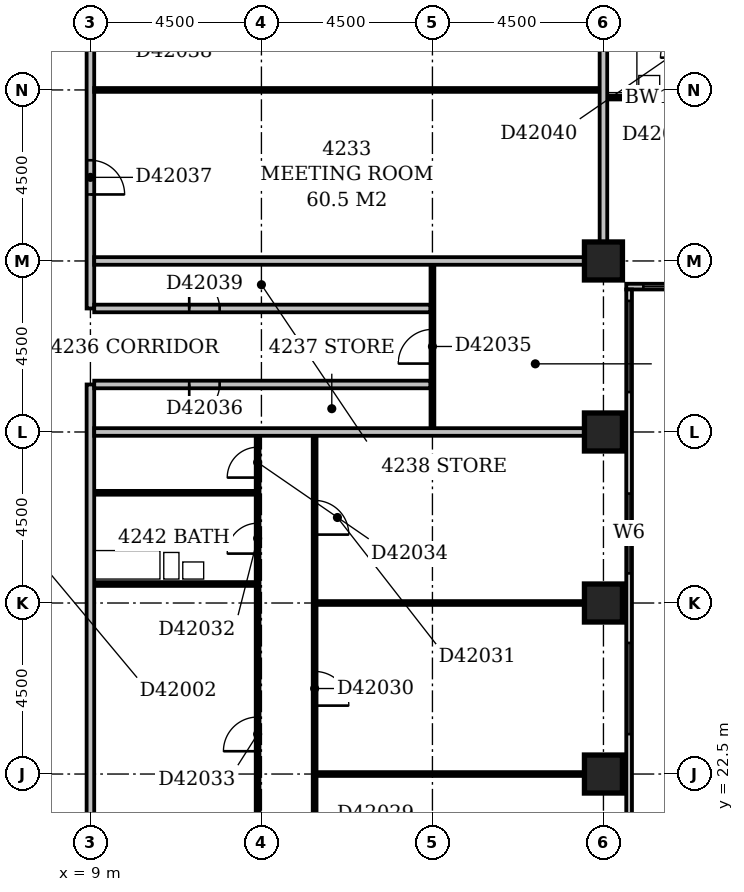
"""IFC4 building model, lengths in metres.
Left out: names, types, materials, properties, quantities, classifications, styles, units other than length and angle.
Written with IfcOpenShell. Run it as: python <this file> out.ifc"""

import sys

from ifc_helpers import new_model, si_unit, direction, frame, frame_2d, origin, origin_2d, place, context, subcontext, project, spatial, rectangle, extrude, element, fill, save


model = new_model("IFC4")
c1 = context("Model", 3, precision=1e-05, world=origin(), true_north=direction((0.0, 1.0)))
c2 = subcontext(c1, "Body", "Model", "MODEL_VIEW")
j1 = project(units=[si_unit("LENGTHUNIT", "METRE"), si_unit("PLANEANGLEUNIT", "RADIAN")], contexts=[c1])
p1 = place(None, origin())
s1 = spatial("IfcSite", under=j1, at=p1, CompositionType="ELEMENT")
p2 = place(p1, origin())
s2 = spatial("IfcBuilding", under=s1, at=p2, CompositionType="ELEMENT")
p3 = place(p2, frame((0.0, 0.0, 166.4)))
s3 = spatial("IfcBuildingStorey", under=s2, at=p3, CompositionType="ELEMENT", Elevation=166.4)
for number, where, z_axis, x_axis in (
    (1, (22.5, 22.5, -0.3), (0.0, 0.0, 1.0), (1.0, 0.0, 0.0)),
    (2, (22.5, 27.0, -0.3), (0.0, 0.0, 1.0), (1.0, 0.0, 0.0)),
    (3, (22.5, 31.5, -0.3), (0.0, 0.0, 1.0), (1.0, 0.0, 0.0)),
    (4, (22.5, 36.0, -0.3), (0.0, 0.0, 1.0), (1.0, 0.0, 0.0)),
):
    element("IfcColumn", number, at=place(p3, frame(where, z_axis=z_axis, x_axis=x_axis)), inside=s3, PredefinedType="COLUMN", context=c2, shape_type="SweptSolid", body=[
        extrude(rectangle(XDim=1.0, YDim=1.0, at=origin_2d()), origin(), (0.0, 0.0, 1.0), 3.6),
    ])
p4 = place(p3, frame((23.175, 17.4, 0.0), z_axis=(0.0, 0.0, 1.0), x_axis=(0.0, 1.0, 0.0)))
e5 = element("IfcWall", 5, at=p4, inside=s3, PredefinedType="STANDARD", context=c2, shape_type="SweptSolid", body=[
    extrude(rectangle(XDim=17.85, YDim=0.15, at=frame_2d((8.925, 0.0))), origin(), (0.0, 0.0, 1.0), 2.7),
])
p5 = place(p4, frame((1.65, 0.0, 0.6)))
e6 = element("IfcOpeningElement", 6, at=p5, cuts=e5, PredefinedType="OPENING", context=c2, shape_type="SweptSolid", body=[
    extrude(rectangle(XDim=2.4, YDim=1.8, at=frame_2d((1.2, 0.9))), frame((0.0, 0.087, 0.0), z_axis=(0.0, -1.0, 0.0), x_axis=(1.0, 0.0, 0.0)), (0.0, 0.0, 1.0), 0.174),
])
p6 = place(p4, frame((6.15, 0.0, 0.6)))
e7 = element("IfcOpeningElement", 7, at=p6, cuts=e5, PredefinedType="OPENING", context=c2, shape_type="SweptSolid", body=[
    extrude(rectangle(XDim=2.4, YDim=1.8, at=frame_2d((1.2, 0.9))), frame((0.0, 0.087, 0.0), z_axis=(0.0, -1.0, 0.0), x_axis=(1.0, 0.0, 0.0)), (0.0, 0.0, 1.0), 0.174),
])
p7 = place(p4, frame((10.38, 0.0, 0.6)))
e8 = element("IfcOpeningElement", 8, at=p7, cuts=e5, PredefinedType="OPENING", context=c2, shape_type="SweptSolid", body=[
    extrude(rectangle(XDim=2.1, YDim=1.8, at=frame_2d((1.05, 0.9))), frame((0.0, 0.087, 0.0), z_axis=(0.0, -1.0, 0.0), x_axis=(1.0, 0.0, 0.0)), (0.0, 0.0, 1.0), 0.174),
])
p8 = place(p4, frame((15.15, 0.0, 0.6)))
e9 = element("IfcOpeningElement", 9, at=p8, cuts=e5, PredefinedType="OPENING", context=c2, shape_type="SweptSolid", body=[
    extrude(rectangle(XDim=2.4, YDim=1.8, at=frame_2d((1.2, 0.9))), frame((0.0, 0.087, 0.0), z_axis=(0.0, -1.0, 0.0), x_axis=(1.0, 0.0, 0.0)), (0.0, 0.0, 1.0), 0.174),
])
p9 = place(p3, frame((23.1, 35.325, 0.0), z_axis=(0.0, 0.0, 1.0), x_axis=(1.0, 0.0, 0.0)))
e10 = element("IfcWall", 10, at=p9, inside=s3, PredefinedType="STANDARD", context=c2, shape_type="SweptSolid", body=[
    extrude(rectangle(XDim=45.15, YDim=0.15, at=frame_2d((22.575, 0.0))), origin(), (0.0, 0.0, 1.0), 2.7),
])
p10 = place(p9, frame((0.45, 0.0, 0.6)))
e11 = element("IfcOpeningElement", 11, at=p10, cuts=e10, PredefinedType="OPENING", context=c2, shape_type="SweptSolid", body=[
    extrude(rectangle(XDim=2.4, YDim=1.8, at=frame_2d((1.2, 0.9))), frame((0.0, 0.087, 0.0), z_axis=(0.0, -1.0, 0.0), x_axis=(1.0, 0.0, 0.0)), (0.0, 0.0, 1.0), 0.174),
])
p11 = place(p9, frame((4.95, 0.0, 0.6)))
e12 = element("IfcOpeningElement", 12, at=p11, cuts=e10, PredefinedType="OPENING", context=c2, shape_type="SweptSolid", body=[
    extrude(rectangle(XDim=2.4, YDim=1.8, at=frame_2d((1.2, 0.9))), frame((0.0, 0.087, 0.0), z_axis=(0.0, -1.0, 0.0), x_axis=(1.0, 0.0, 0.0)), (0.0, 0.0, 1.0), 0.174),
])
p12 = place(p9, frame((10.665, 0.0, 0.6)))
e13 = element("IfcOpeningElement", 13, at=p12, cuts=e10, PredefinedType="OPENING", context=c2, shape_type="SweptSolid", body=[
    extrude(rectangle(XDim=1.5, YDim=1.8, at=frame_2d((0.75, 0.9))), frame((0.0, 0.087, 0.0), z_axis=(0.0, -1.0, 0.0), x_axis=(1.0, 0.0, 0.0)), (0.0, 0.0, 1.0), 0.174),
])
p13 = place(p9, frame((13.731, 0.0, 0.6)))
e14 = element("IfcOpeningElement", 14, at=p13, cuts=e10, PredefinedType="OPENING", context=c2, shape_type="SweptSolid", body=[
    extrude(rectangle(XDim=1.5, YDim=1.8, at=frame_2d((0.75, 0.9))), frame((0.0, 0.087, 0.0), z_axis=(0.0, -1.0, 0.0), x_axis=(1.0, 0.0, 0.0)), (0.0, 0.0, 1.0), 0.174),
])
p14 = place(p9, frame((18.45, 0.0, 0.6)))
e15 = element("IfcOpeningElement", 15, at=p14, cuts=e10, PredefinedType="OPENING", context=c2, shape_type="SweptSolid", body=[
    extrude(rectangle(XDim=2.4, YDim=1.8, at=frame_2d((1.2, 0.9))), frame((0.0, 0.087, 0.0), z_axis=(0.0, -1.0, 0.0), x_axis=(1.0, 0.0, 0.0)), (0.0, 0.0, 1.0), 0.174),
])
p15 = place(p9, frame((22.95, 0.0, 0.6)))
e16 = element("IfcOpeningElement", 16, at=p15, cuts=e10, PredefinedType="OPENING", context=c2, shape_type="SweptSolid", body=[
    extrude(rectangle(XDim=2.4, YDim=1.8, at=frame_2d((1.2, 0.9))), frame((0.0, 0.087, 0.0), z_axis=(0.0, -1.0, 0.0), x_axis=(1.0, 0.0, 0.0)), (0.0, 0.0, 1.0), 0.174),
])
p16 = place(p9, frame((27.45, 0.0, 0.6)))
e17 = element("IfcOpeningElement", 17, at=p16, cuts=e10, PredefinedType="OPENING", context=c2, shape_type="SweptSolid", body=[
    extrude(rectangle(XDim=2.4, YDim=1.8, at=frame_2d((1.2, 0.9))), frame((0.0, 0.087, 0.0), z_axis=(0.0, -1.0, 0.0), x_axis=(1.0, 0.0, 0.0)), (0.0, 0.0, 1.0), 0.174),
])
p17 = place(p9, frame((31.95, 0.0, 0.6)))
e18 = element("IfcOpeningElement", 18, at=p17, cuts=e10, PredefinedType="OPENING", context=c2, shape_type="SweptSolid", body=[
    extrude(rectangle(XDim=2.4, YDim=1.8, at=frame_2d((1.2, 0.9))), frame((0.0, 0.087, 0.0), z_axis=(0.0, -1.0, 0.0), x_axis=(1.0, 0.0, 0.0)), (0.0, 0.0, 1.0), 0.174),
])
p18 = place(p9, frame((36.45, 0.0, 0.6)))
e19 = element("IfcOpeningElement", 19, at=p18, cuts=e10, PredefinedType="OPENING", context=c2, shape_type="SweptSolid", body=[
    extrude(rectangle(XDim=2.4, YDim=1.8, at=frame_2d((1.2, 0.9))), frame((0.0, 0.087, 0.0), z_axis=(0.0, -1.0, 0.0), x_axis=(1.0, 0.0, 0.0)), (0.0, 0.0, 1.0), 0.174),
])
p19 = place(p9, frame((41.172, 0.0, 0.6)))
e20 = element("IfcOpeningElement", 20, at=p19, cuts=e10, PredefinedType="OPENING", context=c2, shape_type="SweptSolid", body=[
    extrude(rectangle(XDim=2.4, YDim=1.8, at=frame_2d((1.2, 0.9))), frame((0.0, 0.087, 0.0), z_axis=(0.0, -1.0, 0.0), x_axis=(1.0, 0.0, 0.0)), (0.0, 0.0, 1.0), 0.174),
])
p20 = place(p3, frame((9.0, 5.0, 0.0), z_axis=(0.0, 0.0, 1.0), x_axis=(0.0, 1.0, 0.0)))
e21 = element("IfcWall", 21, at=p20, inside=s3, PredefinedType="PARTITIONING", context=c2, shape_type="SweptSolid", body=[
    extrude(rectangle(XDim=27.75, YDim=0.2, at=frame_2d((13.875, 0.0))), origin(), (0.0, 0.0, 1.0), 3.3),
])
p21 = place(p20, frame((13.3, 0.0, 0.0)))
e22 = element("IfcOpeningElement", 22, at=p21, cuts=e21, PredefinedType="OPENING", context=c2, shape_type="SweptSolid", body=[
    extrude(rectangle(XDim=1.0, YDim=2.1, at=frame_2d((0.5, 1.05))), frame((0.0, 0.112, 0.0), z_axis=(0.0, -1.0, 0.0), x_axis=(1.0, 0.0, 0.0)), (0.0, 0.0, 1.0), 0.224),
])
p22 = place(p20, frame((10.45, 0.0, 0.0)))
e23 = element("IfcOpeningElement", 23, at=p22, cuts=e21, PredefinedType="OPENING", context=c2, shape_type="SweptSolid", body=[
    extrude(rectangle(XDim=1.0, YDim=2.1, at=frame_2d((0.5, 1.05))), frame((0.0, 0.112, 0.0), z_axis=(0.0, -1.0, 0.0), x_axis=(1.0, 0.0, 0.0)), (0.0, 0.0, 1.0), 0.224),
])
p23 = place(p20, frame((5.95, 0.0, 0.0)))
e24 = element("IfcOpeningElement", 24, at=p23, cuts=e21, PredefinedType="OPENING", context=c2, shape_type="SweptSolid", body=[
    extrude(rectangle(XDim=1.0, YDim=2.1, at=frame_2d((0.5, 1.05))), frame((0.0, 0.112, 0.0), z_axis=(0.0, -1.0, 0.0), x_axis=(1.0, 0.0, 0.0)), (0.0, 0.0, 1.0), 0.224),
])
p24 = place(p20, frame((1.5, 0.0, 0.0)))
e25 = element("IfcOpeningElement", 25, at=p24, cuts=e21, PredefinedType="OPENING", context=c2, shape_type="SweptSolid", body=[
    extrude(rectangle(XDim=0.9, YDim=2.1, at=frame_2d((0.45, 1.05))), frame((0.0, 0.112, 0.0), z_axis=(0.0, -1.0, 0.0), x_axis=(1.0, 0.0, 0.0)), (0.0, 0.0, 1.0), 0.224),
])
p25 = place(p3, frame((14.9, 18.1, 0.0), z_axis=(0.0, 0.0, 1.0), x_axis=(0.0, 1.0, 0.0)))
e26 = element("IfcWall", 26, at=p25, inside=s3, PredefinedType="PARTITIONING", context=c2, shape_type="SweptSolid", body=[
    extrude(rectangle(XDim=13.3, YDim=0.1, at=frame_2d((6.65, 0.0))), origin(), (0.0, 0.0, 1.0), 3.3),
])
p26 = place(p25, frame((1.7, 0.0, 0.0)))
e27 = element("IfcOpeningElement", 27, at=p26, cuts=e26, PredefinedType="OPENING", context=c2, shape_type="SweptSolid", body=[
    extrude(rectangle(XDim=0.9, YDim=2.1, at=frame_2d((0.45, 1.05))), frame((0.0, 0.062, 0.0), z_axis=(0.0, -1.0, 0.0), x_axis=(1.0, 0.0, 0.0)), (0.0, 0.0, 1.0), 0.124),
])
p27 = place(p25, frame((6.2, 0.0, 0.0)))
e28 = element("IfcOpeningElement", 28, at=p27, cuts=e26, PredefinedType="OPENING", context=c2, shape_type="SweptSolid", body=[
    extrude(rectangle(XDim=0.9, YDim=2.1, at=frame_2d((0.45, 1.05))), frame((0.0, 0.062, 0.0), z_axis=(0.0, -1.0, 0.0), x_axis=(1.0, 0.0, 0.0)), (0.0, 0.0, 1.0), 0.124),
])
p28 = place(p25, frame((10.7, 0.0, 0.0)))
e29 = element("IfcOpeningElement", 29, at=p28, cuts=e26, PredefinedType="OPENING", context=c2, shape_type="SweptSolid", body=[
    extrude(rectangle(XDim=0.9, YDim=2.1, at=frame_2d((0.45, 1.05))), frame((0.0, 0.062, 0.0), z_axis=(0.0, -1.0, 0.0), x_axis=(1.0, 0.0, 0.0)), (0.0, 0.0, 1.0), 0.124),
])
p29 = place(p3, frame((13.4, 19.6, 0.0), z_axis=(0.0, 0.0, 1.0), x_axis=(0.0, 1.0, 0.0)))
e30 = element("IfcWall", 30, at=p29, inside=s3, PredefinedType="PARTITIONING", context=c2, shape_type="SweptSolid", body=[
    extrude(rectangle(XDim=11.8, YDim=0.1, at=frame_2d((5.9, 0.0))), origin(), (0.0, 0.0, 1.0), 3.3),
])
p30 = place(p29, frame((8.7, 0.0, 0.0)))
e31 = element("IfcOpeningElement", 31, at=p30, cuts=e30, PredefinedType="OPENING", context=c2, shape_type="SweptSolid", body=[
    extrude(rectangle(XDim=0.8, YDim=2.1, at=frame_2d((0.4, 1.05))), frame((0.0, 0.062, 0.0), z_axis=(0.0, -1.0, 0.0), x_axis=(1.0, 0.0, 0.0)), (0.0, 0.0, 1.0), 0.124),
])
p31 = place(p29, frame((3.5, 0.0, 0.0)))
e32 = element("IfcOpeningElement", 32, at=p31, cuts=e30, PredefinedType="OPENING", context=c2, shape_type="SweptSolid", body=[
    extrude(rectangle(XDim=0.9, YDim=2.1, at=frame_2d((0.45, 1.05))), frame((0.0, 0.062, 0.0), z_axis=(0.0, -1.0, 0.0), x_axis=(1.0, 0.0, 0.0)), (0.0, 0.0, 1.0), 0.124),
])
p32 = place(p29, frame((10.7, 0.0, 0.0)))
e33 = element("IfcOpeningElement", 33, at=p32, cuts=e30, PredefinedType="OPENING", context=c2, shape_type="SweptSolid", body=[
    extrude(rectangle(XDim=0.8, YDim=2.1, at=frame_2d((0.4, 1.05))), frame((0.0, 0.062, 0.0), z_axis=(0.0, -1.0, 0.0), x_axis=(1.0, 0.0, 0.0)), (0.0, 0.0, 1.0), 0.124),
])
p33 = place(p3, frame((14.95, 22.5, 0.0), z_axis=(0.0, 0.0, 1.0), x_axis=(1.0, 0.0, 0.0)))
e34 = element("IfcWall", 34, at=p33, inside=s3, PredefinedType="PARTITIONING", context=c2, shape_type="SweptSolid", body=[
    extrude(rectangle(XDim=7.05, YDim=0.1, at=frame_2d((3.525, 0.0))), origin(), (0.0, 0.0, 1.0), 3.3),
])
p34 = place(p3, frame((14.95, 27.0, 0.0), z_axis=(0.0, 0.0, 1.0), x_axis=(1.0, 0.0, 0.0)))
e35 = element("IfcWall", 35, at=p34, inside=s3, PredefinedType="PARTITIONING", context=c2, shape_type="SweptSolid", body=[
    extrude(rectangle(XDim=7.05, YDim=0.1, at=frame_2d((3.525, 0.0))), origin(), (0.0, 0.0, 1.0), 2.7),
])
p35 = place(p3, frame((9.1, 27.5, 0.0), z_axis=(0.0, 0.0, 1.0), x_axis=(1.0, 0.0, 0.0)))
e36 = element("IfcWall", 36, at=p35, inside=s3, PredefinedType="PLUMBINGWALL", context=c2, shape_type="SweptSolid", body=[
    extrude(rectangle(XDim=4.25, YDim=0.1, at=frame_2d((2.125, 0.0))), origin(), (0.0, 0.0, 1.0), 2.7),
])
p36 = place(p3, frame((9.1, 29.9, 0.0), z_axis=(0.0, 0.0, 1.0), x_axis=(1.0, 0.0, 0.0)))
e37 = element("IfcWall", 37, at=p36, inside=s3, PredefinedType="PLUMBINGWALL", context=c2, shape_type="SweptSolid", body=[
    extrude(rectangle(XDim=4.25, YDim=0.1, at=frame_2d((2.125, 0.0))), origin(), (0.0, 0.0, 1.0), 3.3),
])
p37 = place(p3, frame((9.1, 31.5, 0.0), z_axis=(0.0, 0.0, 1.0), x_axis=(1.0, 0.0, 0.0)))
e38 = element("IfcWall", 38, at=p37, inside=s3, PredefinedType="PARTITIONING", context=c2, shape_type="SweptSolid", body=[
    extrude(rectangle(XDim=12.9, YDim=0.2, at=frame_2d((6.45, 0.0))), origin(), (0.0, 0.0, 1.0), 3.3),
])
p38 = place(p3, frame((18.0, 31.6, 0.0), z_axis=(0.0, 0.0, 1.0), x_axis=(0.0, 1.0, 0.0)))
e39 = element("IfcWall", 39, at=p38, inside=s3, PredefinedType="PARTITIONING", context=c2, shape_type="SweptSolid", body=[
    extrude(rectangle(XDim=4.3, YDim=0.1, at=frame_2d((2.15, 0.0))), origin(), (0.0, 0.0, 1.0), 3.3),
])
p39 = place(p38, frame((1.7, 0.0, 0.0)))
e40 = element("IfcOpeningElement", 40, at=p39, cuts=e39, PredefinedType="OPENING", context=c2, shape_type="SweptSolid", body=[
    extrude(rectangle(XDim=0.9, YDim=2.1, at=frame_2d((0.45, 1.05))), frame((0.0, 0.062, 0.0), z_axis=(0.0, -1.0, 0.0), x_axis=(1.0, 0.0, 0.0)), (0.0, 0.0, 1.0), 0.124),
])
p40 = place(p3, frame((9.1, 32.75, 0.0), z_axis=(0.0, 0.0, 1.0), x_axis=(1.0, 0.0, 0.0)))
e41 = element("IfcWall", 41, at=p40, inside=s3, PredefinedType="PARTITIONING", context=c2, shape_type="SweptSolid", body=[
    extrude(rectangle(XDim=8.85, YDim=0.2, at=frame_2d((4.425, 0.0))), origin(), (0.0, 0.0, 1.0), 3.3),
])
p41 = place(p40, frame((2.5, 0.0, 0.0)))
e42 = element("IfcOpeningElement", 42, at=p41, cuts=e41, PredefinedType="OPENING", context=c2, shape_type="SweptSolid", body=[
    extrude(rectangle(XDim=0.8, YDim=2.1, at=frame_2d((0.4, 1.05))), frame((0.0, 0.112, 0.0), z_axis=(0.0, -1.0, 0.0), x_axis=(1.0, 0.0, 0.0)), (0.0, 0.0, 1.0), 0.224),
])
p42 = place(p3, frame((9.0, 34.75, 0.0), z_axis=(0.0, 0.0, 1.0), x_axis=(0.0, 1.0, 0.0)))
e43 = element("IfcWall", 43, at=p42, inside=s3, PredefinedType="PARTITIONING", context=c2, shape_type="SweptSolid", body=[
    extrude(rectangle(XDim=14.75, YDim=0.2, at=frame_2d((7.375, 0.0))), origin(), (0.0, 0.0, 1.0), 3.3),
])
p43 = place(p42, frame((3.0, 0.0, 0.0)))
e44 = element("IfcOpeningElement", 44, at=p43, cuts=e43, PredefinedType="OPENING", context=c2, shape_type="SweptSolid", body=[
    extrude(rectangle(XDim=0.9, YDim=2.1, at=frame_2d((0.45, 1.05))), frame((0.0, 0.112, 0.0), z_axis=(0.0, -1.0, 0.0), x_axis=(1.0, 0.0, 0.0)), (0.0, 0.0, 1.0), 0.224),
])
p44 = place(p42, frame((7.5, 0.0, 0.0)))
e45 = element("IfcOpeningElement", 45, at=p44, cuts=e43, PredefinedType="OPENING", context=c2, shape_type="SweptSolid", body=[
    extrude(rectangle(XDim=0.9, YDim=2.1, at=frame_2d((0.45, 1.05))), frame((0.0, 0.112, 0.0), z_axis=(0.0, -1.0, 0.0), x_axis=(1.0, 0.0, 0.0)), (0.0, 0.0, 1.0), 0.224),
])
p45 = place(p3, frame((9.1, 34.75, 0.0), z_axis=(0.0, 0.0, 1.0), x_axis=(1.0, 0.0, 0.0)))
e46 = element("IfcWall", 46, at=p45, inside=s3, PredefinedType="PARTITIONING", context=c2, shape_type="SweptSolid", body=[
    extrude(rectangle(XDim=8.85, YDim=0.2, at=frame_2d((4.425, 0.0))), origin(), (0.0, 0.0, 1.0), 3.3),
])
p46 = place(p45, frame((2.5, 0.0, 0.0)))
e47 = element("IfcOpeningElement", 47, at=p46, cuts=e46, PredefinedType="OPENING", context=c2, shape_type="SweptSolid", body=[
    extrude(rectangle(XDim=0.8, YDim=2.1, at=frame_2d((0.4, 1.05))), frame((0.0, 0.112, 0.0), z_axis=(0.0, -1.0, 0.0), x_axis=(1.0, 0.0, 0.0)), (0.0, 0.0, 1.0), 0.224),
])
for number, where, z_axis, x_axis in (
    (48, (9.1, 36.0, 0.0), (0.0, 0.0, 1.0), (1.0, 0.0, 0.0)),
    (49, (22.5, 36.5, 0.0), (0.0, 0.0, 1.0), (0.0, 1.0, 0.0)),
):
    element("IfcWall", number, at=place(p3, frame(where, z_axis=z_axis, x_axis=x_axis)), inside=s3, PredefinedType="PARTITIONING", context=c2, shape_type="SweptSolid", body=[
        extrude(rectangle(XDim=12.9, YDim=0.2, at=frame_2d((6.45, 0.0))), origin(), (0.0, 0.0, 1.0), 3.3),
    ])
p47 = place(p3, frame((22.6, 40.3, 0.0), z_axis=(0.0, 0.0, 1.0), x_axis=(1.0, 0.0, 0.0)))
e50 = element("IfcWall", 50, at=p47, inside=s3, PredefinedType="PLUMBINGWALL", context=c2, shape_type="SweptSolid", body=[
    extrude(rectangle(XDim=2.15, YDim=0.1, at=frame_2d((1.075, 0.0))), origin(), (0.0, 0.0, 1.0), 3.3),
])
p48 = place(p3, frame((9.1, 40.5, 0.0), z_axis=(0.0, 0.0, 1.0), x_axis=(1.0, 0.0, 0.0)))
e51 = element("IfcWall", 51, at=p48, inside=s3, PredefinedType="PARTITIONING", context=c2, shape_type="SweptSolid", body=[
    extrude(rectangle(XDim=13.3, YDim=0.1, at=frame_2d((6.65, 0.0))), origin(), (0.0, 0.0, 1.0), 3.3),
])
p49 = place(p6, origin())
e52 = element("IfcWindow", 52, at=p49, inside=s3, PartitioningType="SINGLE_PANEL", PredefinedType="WINDOW", context=c2, shape_type="SweptSolid", body=[
    extrude(rectangle(XDim=2.4, YDim=1.8, at=frame_2d((1.2, 0.9))), frame((0.0, 0.03, 0.0), z_axis=(0.0, -1.0, 0.0), x_axis=(1.0, 0.0, 0.0)), (0.0, 0.0, 1.0), 0.06),
])
fill(e7, e52)
p50 = place(p7, origin())
e53 = element("IfcWindow", 53, at=p50, inside=s3, PartitioningType="SINGLE_PANEL", PredefinedType="WINDOW", context=c2, shape_type="SweptSolid", body=[
    extrude(rectangle(XDim=2.1, YDim=1.8, at=frame_2d((1.05, 0.9))), frame((0.0, 0.03, 0.0), z_axis=(0.0, -1.0, 0.0), x_axis=(1.0, 0.0, 0.0)), (0.0, 0.0, 1.0), 0.06),
])
fill(e8, e53)
p51 = place(p8, origin())
e54 = element("IfcWindow", 54, at=p51, inside=s3, PartitioningType="SINGLE_PANEL", PredefinedType="WINDOW", context=c2, shape_type="SweptSolid", body=[
    extrude(rectangle(XDim=2.4, YDim=1.8, at=frame_2d((1.2, 0.9))), frame((0.0, 0.03, 0.0), z_axis=(0.0, -1.0, 0.0), x_axis=(1.0, 0.0, 0.0)), (0.0, 0.0, 1.0), 0.06),
])
fill(e9, e54)
p52 = place(p10, origin())
e55 = element("IfcWindow", 55, at=p52, inside=s3, PartitioningType="SINGLE_PANEL", PredefinedType="WINDOW", context=c2, shape_type="SweptSolid", body=[
    extrude(rectangle(XDim=2.4, YDim=1.8, at=frame_2d((1.2, 0.9))), frame((0.0, 0.03, 0.0), z_axis=(0.0, -1.0, 0.0), x_axis=(1.0, 0.0, 0.0)), (0.0, 0.0, 1.0), 0.06),
])
fill(e11, e55)
p53 = place(p27, frame((0.9, 0.0, 0.0), z_axis=(0.0, 0.0, 1.0), x_axis=(-1.0, 0.0, 0.0)))
e56 = element("IfcDoor", 56, at=p53, inside=s3, OperationType="SINGLE_SWING_RIGHT", PredefinedType="DOOR", context=c2, shape_type="SweptSolid", body=[
    extrude(rectangle(XDim=0.9, YDim=2.1, at=frame_2d((0.45, 1.05))), frame((0.0, 0.025, 0.0), z_axis=(0.0, -1.0, 0.0), x_axis=(1.0, 0.0, 0.0)), (0.0, 0.0, 1.0), 0.05),
])
fill(e28, e56)
p54 = place(p28, frame((0.9, 0.0, 0.0), z_axis=(0.0, 0.0, 1.0), x_axis=(-1.0, 0.0, 0.0)))
e57 = element("IfcDoor", 57, at=p54, inside=s3, OperationType="SINGLE_SWING_RIGHT", PredefinedType="DOOR", context=c2, shape_type="SweptSolid", body=[
    extrude(rectangle(XDim=0.9, YDim=2.1, at=frame_2d((0.45, 1.05))), frame((0.0, 0.025, 0.0), z_axis=(0.0, -1.0, 0.0), x_axis=(1.0, 0.0, 0.0)), (0.0, 0.0, 1.0), 0.05),
])
fill(e29, e57)
p55 = place(p30, origin())
e58 = element("IfcDoor", 58, at=p55, inside=s3, OperationType="SINGLE_SWING_LEFT", PredefinedType="DOOR", context=c2, shape_type="SweptSolid", body=[
    extrude(rectangle(XDim=0.8, YDim=2.1, at=frame_2d((0.4, 1.05))), frame((0.0, 0.025, 0.0), z_axis=(0.0, -1.0, 0.0), x_axis=(1.0, 0.0, 0.0)), (0.0, 0.0, 1.0), 0.05),
])
fill(e31, e58)
p56 = place(p31, origin())
e59 = element("IfcDoor", 59, at=p56, inside=s3, OperationType="SINGLE_SWING_LEFT", PredefinedType="DOOR", context=c2, shape_type="SweptSolid", body=[
    extrude(rectangle(XDim=0.9, YDim=2.1, at=frame_2d((0.45, 1.05))), frame((0.0, 0.025, 0.0), z_axis=(0.0, -1.0, 0.0), x_axis=(1.0, 0.0, 0.0)), (0.0, 0.0, 1.0), 0.05),
])
fill(e32, e59)
p57 = place(p32, origin())
e60 = element("IfcDoor", 60, at=p57, inside=s3, OperationType="SINGLE_SWING_LEFT", PredefinedType="DOOR", context=c2, shape_type="SweptSolid", body=[
    extrude(rectangle(XDim=0.8, YDim=2.1, at=frame_2d((0.4, 1.05))), frame((0.0, 0.025, 0.0), z_axis=(0.0, -1.0, 0.0), x_axis=(1.0, 0.0, 0.0)), (0.0, 0.0, 1.0), 0.05),
])
fill(e33, e60)
p58 = place(p39, origin())
e61 = element("IfcDoor", 61, at=p58, inside=s3, OperationType="SINGLE_SWING_LEFT", PredefinedType="DOOR", context=c2, shape_type="SweptSolid", body=[
    extrude(rectangle(XDim=0.9, YDim=2.1, at=frame_2d((0.45, 1.05))), frame((0.0, 0.025, 0.0), z_axis=(0.0, -1.0, 0.0), x_axis=(1.0, 0.0, 0.0)), (0.0, 0.0, 1.0), 0.05),
])
fill(e40, e61)
p59 = place(p41, frame((0.8, 0.0, 0.0), z_axis=(0.0, 0.0, 1.0), x_axis=(-1.0, 0.0, 0.0)))
e62 = element("IfcDoor", 62, at=p59, inside=s3, OperationType="SINGLE_SWING_RIGHT", PredefinedType="DOOR", context=c2, shape_type="SweptSolid", body=[
    extrude(rectangle(XDim=0.8, YDim=2.1, at=frame_2d((0.4, 1.05))), frame((0.0, 0.025, 0.0), z_axis=(0.0, -1.0, 0.0), x_axis=(1.0, 0.0, 0.0)), (0.0, 0.0, 1.0), 0.05),
])
fill(e42, e62)
p60 = place(p43, frame((0.9, 0.0, 0.0), z_axis=(0.0, 0.0, 1.0), x_axis=(-1.0, 0.0, 0.0)))
e63 = element("IfcDoor", 63, at=p60, inside=s3, OperationType="SINGLE_SWING_RIGHT", PredefinedType="DOOR", context=c2, shape_type="SweptSolid", body=[
    extrude(rectangle(XDim=0.9, YDim=2.1, at=frame_2d((0.45, 1.05))), frame((0.0, 0.025, 0.0), z_axis=(0.0, -1.0, 0.0), x_axis=(1.0, 0.0, 0.0)), (0.0, 0.0, 1.0), 0.05),
])
fill(e44, e63)
p61 = place(p46, origin())
e64 = element("IfcDoor", 64, at=p61, inside=s3, OperationType="SINGLE_SWING_LEFT", PredefinedType="DOOR", context=c2, shape_type="SweptSolid", body=[
    extrude(rectangle(XDim=0.8, YDim=2.1, at=frame_2d((0.4, 1.05))), frame((0.0, 0.025, 0.0), z_axis=(0.0, -1.0, 0.0), x_axis=(1.0, 0.0, 0.0)), (0.0, 0.0, 1.0), 0.05),
])
fill(e47, e64)
save(model, sys.argv[1])
